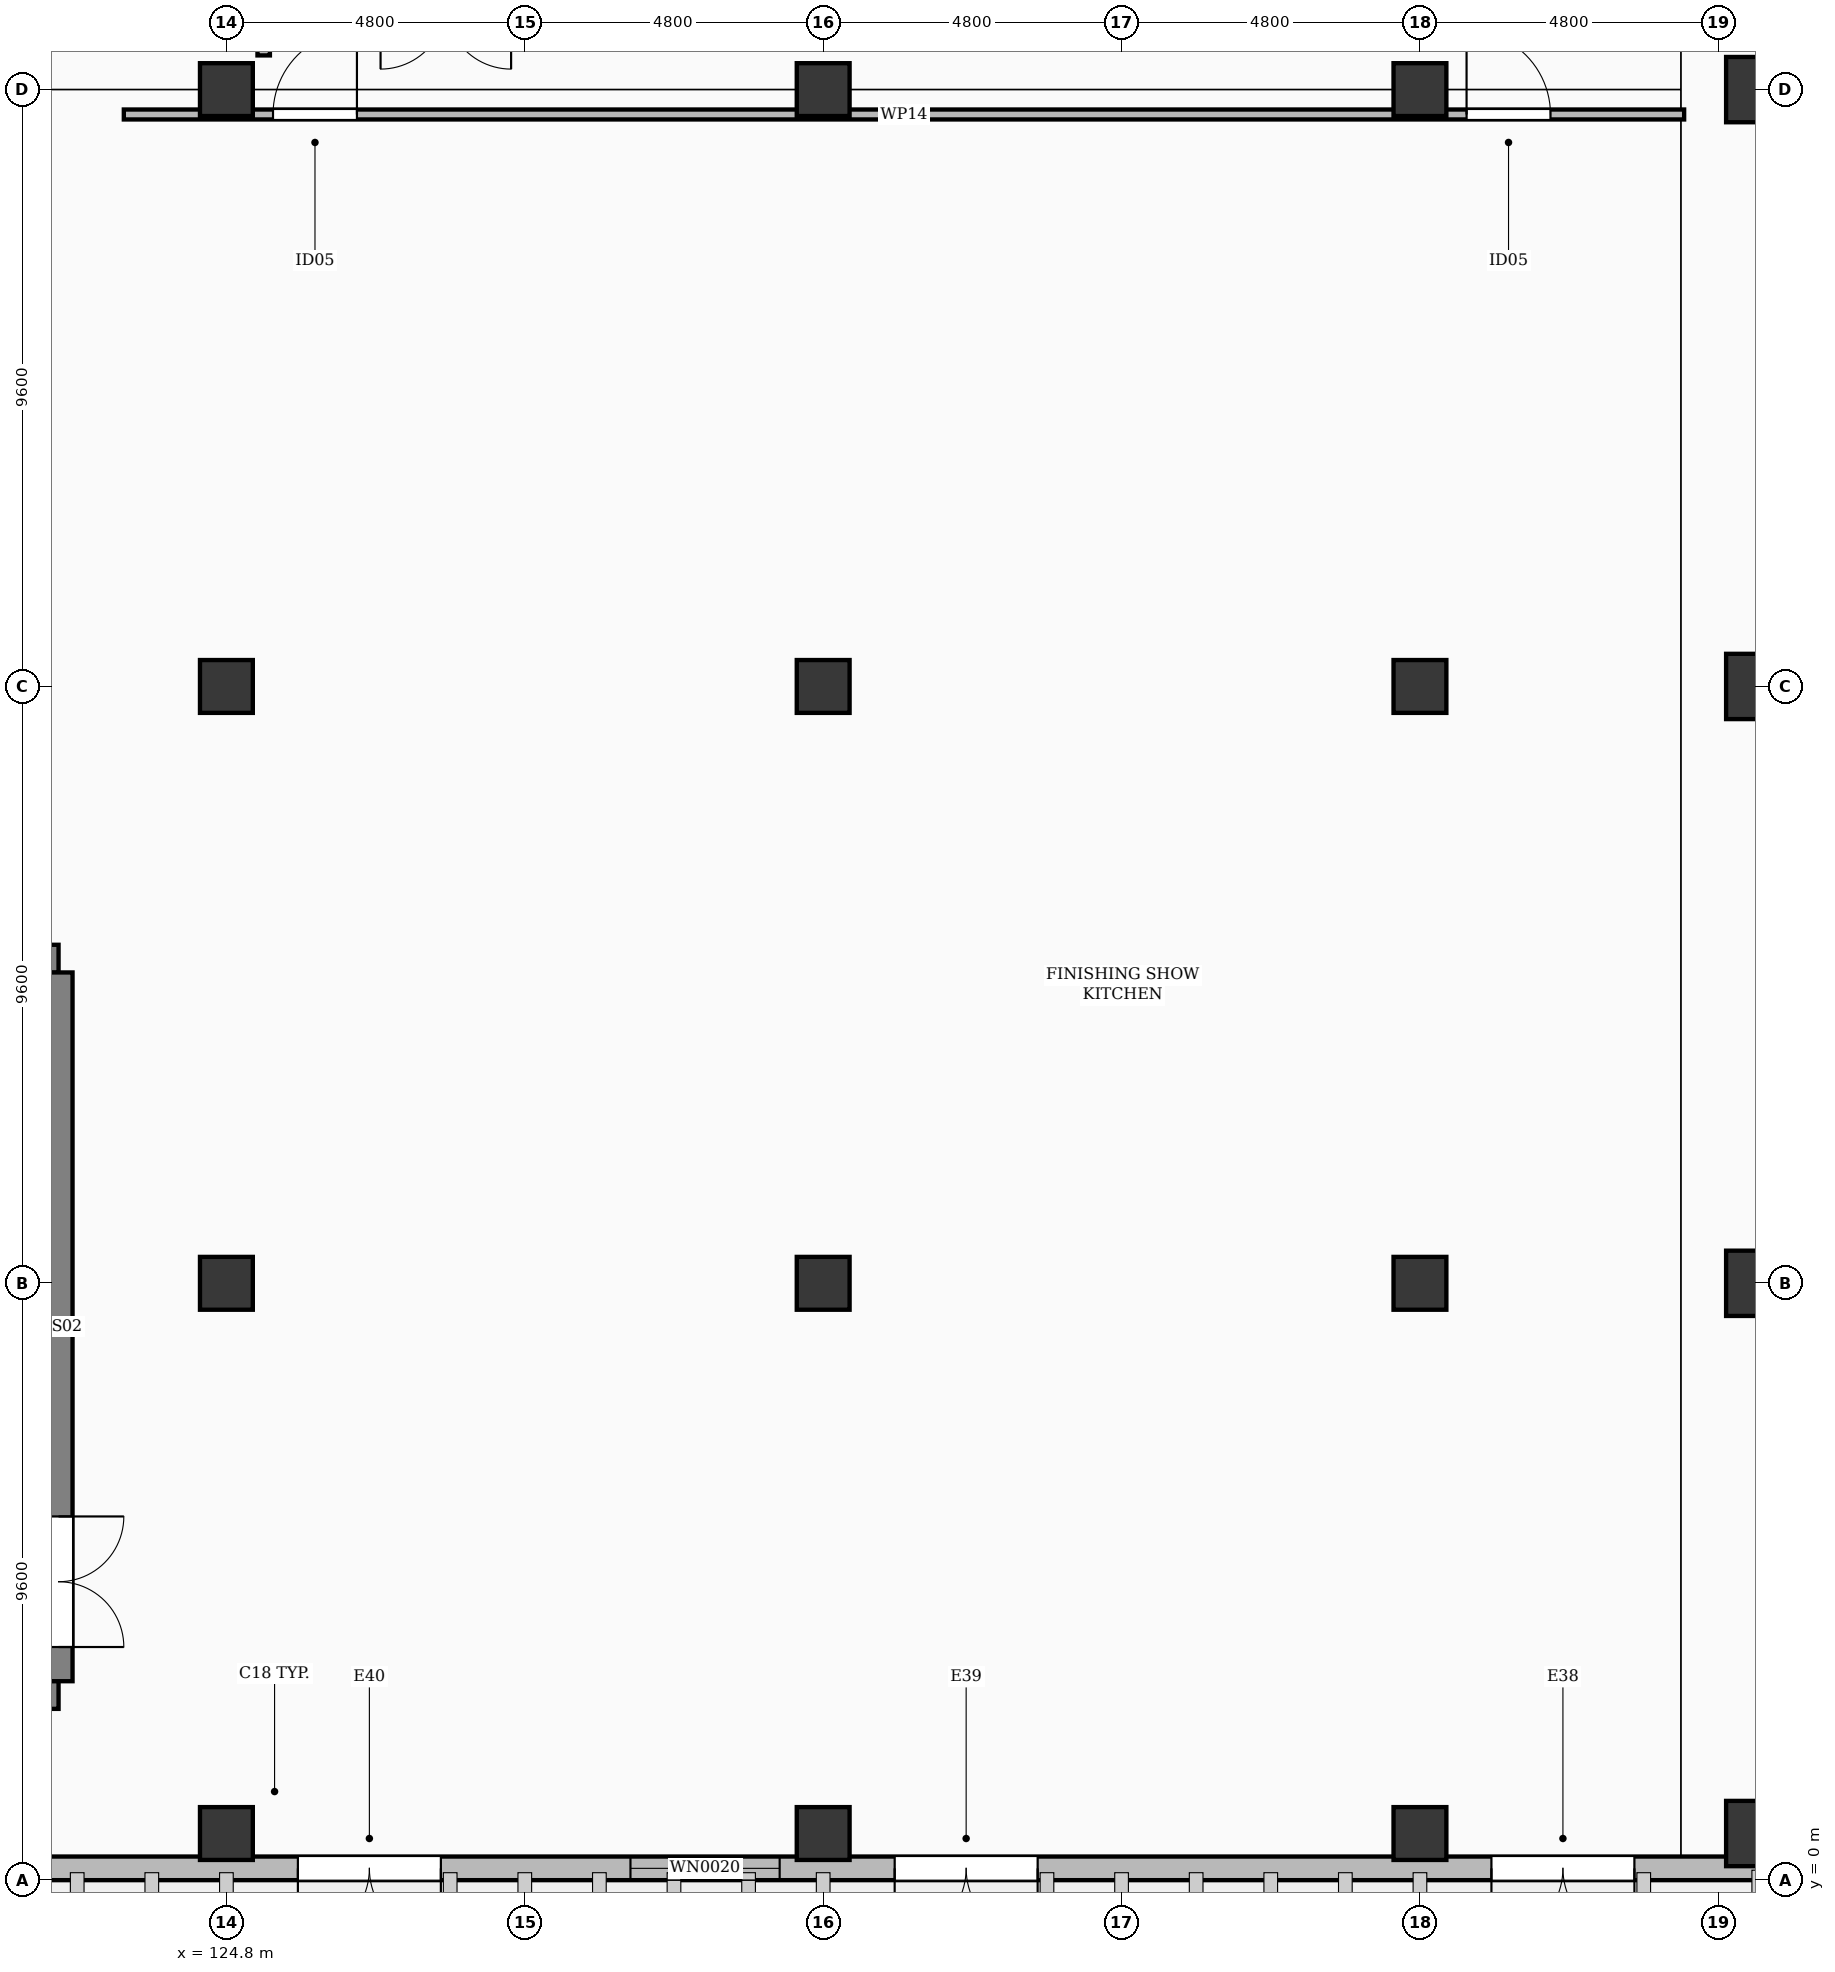
"""IFC4 building model, lengths in metres.
Left out: names, types, materials, properties, quantities, classifications, styles, units other than length and angle.
Written with IfcOpenShell. Run it as: python <this file> out.ifc"""

import sys

from ifc_helpers import new_model, si_unit, direction, frame, frame_2d, origin, origin_2d, place, context, subcontext, project, spatial, rectangle, extrude, element, fill, save


model = new_model("IFC4")
c1 = context("Model", 3, precision=1e-05, world=origin(), true_north=direction((0.0, 1.0)))
c2 = subcontext(c1, "Body", "Model", "MODEL_VIEW")
j1 = project(units=[si_unit("LENGTHUNIT", "METRE"), si_unit("PLANEANGLEUNIT", "RADIAN")], contexts=[c1])
p1 = place(None, origin())
s1 = spatial("IfcSite", under=j1, at=p1, CompositionType="ELEMENT")
p2 = place(p1, origin())
s2 = spatial("IfcBuilding", under=s1, at=p2, CompositionType="ELEMENT")
p3 = place(p2, origin())
s3 = spatial("IfcBuildingStorey", under=s2, at=p3, CompositionType="ELEMENT", Elevation=0.0)
for number, where, z_axis, x_axis in (
    (1, (124.8, 0.75, 0.0), (0.0, 0.0, 1.0), (1.0, 0.0, 0.0)),
    (2, (124.8, 9.6, 0.0), (0.0, 0.0, 1.0), (1.0, 0.0, 0.0)),
    (3, (124.8, 19.2, 0.0), (0.0, 0.0, 1.0), (1.0, 0.0, 0.0)),
    (4, (124.8, 28.8, 0.0), (0.0, 0.0, 1.0), (1.0, 0.0, 0.0)),
    (5, (134.4, 0.75, 0.0), (0.0, 0.0, 1.0), (1.0, 0.0, 0.0)),
    (6, (134.4, 9.6, 0.0), (0.0, 0.0, 1.0), (1.0, 0.0, 0.0)),
    (7, (134.4, 19.2, 0.0), (0.0, 0.0, 1.0), (1.0, 0.0, 0.0)),
    (8, (134.4, 28.8, 0.0), (0.0, 0.0, 1.0), (1.0, 0.0, 0.0)),
    (9, (144.0, 0.75, 0.0), (0.0, 0.0, 1.0), (1.0, 0.0, 0.0)),
    (10, (144.0, 9.6, 0.0), (0.0, 0.0, 1.0), (1.0, 0.0, 0.0)),
    (11, (144.0, 19.2, 0.0), (0.0, 0.0, 1.0), (1.0, 0.0, 0.0)),
    (12, (144.0, 28.8, 0.0), (0.0, 0.0, 1.0), (1.0, 0.0, 0.0)),
):
    element("IfcColumn", number, at=place(p3, frame(where, z_axis=z_axis, x_axis=x_axis)), inside=s3, PredefinedType="COLUMN", context=c2, shape_type="SweptSolid", body=[
        extrude(rectangle(XDim=0.85, YDim=0.85, at=origin_2d()), origin(), (0.0, 0.0, 1.0), 6.0),
    ])
for number, where, z_axis, x_axis in (
    (13, (149.45, 0.75, 0.0), (0.0, 0.0, 1.0), (1.0, 0.0, 0.0)),
    (14, (149.45, 9.6, 0.0), (0.0, 0.0, 1.0), (1.0, 0.0, 0.0)),
    (15, (149.45, 19.2, 0.0), (0.0, 0.0, 1.0), (1.0, 0.0, 0.0)),
    (16, (149.45, 28.8, 0.0), (0.0, 0.0, 1.0), (1.0, 0.0, 0.0)),
):
    element("IfcColumn", number, at=place(p3, frame(where, z_axis=z_axis, x_axis=x_axis)), inside=s3, PredefinedType="COLUMN", context=c2, shape_type="SweptSolid", body=[
        extrude(rectangle(XDim=1.05, YDim=1.05, at=origin_2d()), origin(), (0.0, 0.0, 1.0), 6.0),
    ])
p4 = place(p3, frame((179.65, 0.19, 0.0), z_axis=(0.0, 0.0, 1.0), x_axis=(-1.0, 0.0, 0.0)))
e17 = element("IfcWall", 17, at=p4, inside=s3, PredefinedType="SOLIDWALL", context=c2, shape_type="SweptSolid", body=[
    extrude(rectangle(XDim=121.9, YDim=0.38, at=frame_2d((60.95, 0.0))), origin(), (0.0, 0.0, 1.0), 5.142),
])
p5 = place(p4, frame((3.4, 0.0, 0.0)))
e18 = element("IfcOpeningElement", 18, at=p5, cuts=e17, PredefinedType="OPENING", context=c2, shape_type="SweptSolid", body=[
    extrude(rectangle(XDim=2.3, YDim=2.4, at=frame_2d((1.15, 1.2))), frame((0.0, 0.202, 0.0), z_axis=(0.0, -1.0, 0.0), x_axis=(1.0, 0.0, 0.0)), (0.0, 0.0, 1.0), 0.404),
])
p6 = place(p4, frame((14.05, 0.0, 0.0)))
e19 = element("IfcOpeningElement", 19, at=p6, cuts=e17, PredefinedType="OPENING", context=c2, shape_type="SweptSolid", body=[
    extrude(rectangle(XDim=2.3, YDim=2.4, at=frame_2d((1.15, 1.2))), frame((0.0, 0.202, 0.0), z_axis=(0.0, -1.0, 0.0), x_axis=(1.0, 0.0, 0.0)), (0.0, 0.0, 1.0), 0.404),
])
p7 = place(p4, frame((22.6, 0.0, 0.0)))
e20 = element("IfcOpeningElement", 20, at=p7, cuts=e17, PredefinedType="OPENING", context=c2, shape_type="SweptSolid", body=[
    extrude(rectangle(XDim=2.3, YDim=2.4, at=frame_2d((1.15, 1.2))), frame((0.0, 0.202, 0.0), z_axis=(0.0, -1.0, 0.0), x_axis=(1.0, 0.0, 0.0)), (0.0, 0.0, 1.0), 0.404),
])
p8 = place(p4, frame((32.2, 0.0, 0.0)))
e21 = element("IfcOpeningElement", 21, at=p8, cuts=e17, PredefinedType="OPENING", context=c2, shape_type="SweptSolid", body=[
    extrude(rectangle(XDim=2.3, YDim=2.4, at=frame_2d((1.15, 1.2))), frame((0.0, 0.202, 0.0), z_axis=(0.0, -1.0, 0.0), x_axis=(1.0, 0.0, 0.0)), (0.0, 0.0, 1.0), 0.404),
])
p9 = place(p4, frame((41.8, 0.0, 0.0)))
e22 = element("IfcOpeningElement", 22, at=p9, cuts=e17, PredefinedType="OPENING", context=c2, shape_type="SweptSolid", body=[
    extrude(rectangle(XDim=2.3, YDim=2.4, at=frame_2d((1.15, 1.2))), frame((0.0, 0.202, 0.0), z_axis=(0.0, -1.0, 0.0), x_axis=(1.0, 0.0, 0.0)), (0.0, 0.0, 1.0), 0.404),
])
p10 = place(p4, frame((51.4, 0.0, 0.0)))
e23 = element("IfcOpeningElement", 23, at=p10, cuts=e17, PredefinedType="OPENING", context=c2, shape_type="SweptSolid", body=[
    extrude(rectangle(XDim=2.3, YDim=2.4, at=frame_2d((1.15, 1.2))), frame((0.0, 0.202, 0.0), z_axis=(0.0, -1.0, 0.0), x_axis=(1.0, 0.0, 0.0)), (0.0, 0.0, 1.0), 0.404),
])
p11 = place(p4, frame((61.0, 0.0, 0.0)))
e24 = element("IfcOpeningElement", 24, at=p11, cuts=e17, PredefinedType="OPENING", context=c2, shape_type="SweptSolid", body=[
    extrude(rectangle(XDim=2.3, YDim=2.4, at=frame_2d((1.15, 1.2))), frame((0.0, 0.202, 0.0), z_axis=(0.0, -1.0, 0.0), x_axis=(1.0, 0.0, 0.0)), (0.0, 0.0, 1.0), 0.404),
])
p12 = place(p4, frame((70.6, 0.0, 0.0)))
e25 = element("IfcOpeningElement", 25, at=p12, cuts=e17, PredefinedType="OPENING", context=c2, shape_type="SweptSolid", body=[
    extrude(rectangle(XDim=2.3, YDim=2.4, at=frame_2d((1.15, 1.2))), frame((0.0, 0.202, 0.0), z_axis=(0.0, -1.0, 0.0), x_axis=(1.0, 0.0, 0.0)), (0.0, 0.0, 1.0), 0.404),
])
p13 = place(p4, frame((80.2, 0.0, 0.0)))
e26 = element("IfcOpeningElement", 26, at=p13, cuts=e17, PredefinedType="OPENING", context=c2, shape_type="SweptSolid", body=[
    extrude(rectangle(XDim=2.3, YDim=2.4, at=frame_2d((1.15, 1.2))), frame((0.0, 0.202, 0.0), z_axis=(0.0, -1.0, 0.0), x_axis=(1.0, 0.0, 0.0)), (0.0, 0.0, 1.0), 0.404),
])
p14 = place(p4, frame((89.8, 0.0, 0.0)))
e27 = element("IfcOpeningElement", 27, at=p14, cuts=e17, PredefinedType="OPENING", context=c2, shape_type="SweptSolid", body=[
    extrude(rectangle(XDim=2.3, YDim=2.4, at=frame_2d((1.15, 1.2))), frame((0.0, 0.202, 0.0), z_axis=(0.0, -1.0, 0.0), x_axis=(1.0, 0.0, 0.0)), (0.0, 0.0, 1.0), 0.404),
])
p15 = place(p4, frame((99.4, 0.0, 0.0)))
e28 = element("IfcOpeningElement", 28, at=p15, cuts=e17, PredefinedType="OPENING", context=c2, shape_type="SweptSolid", body=[
    extrude(rectangle(XDim=2.3, YDim=2.4, at=frame_2d((1.15, 1.2))), frame((0.0, 0.202, 0.0), z_axis=(0.0, -1.0, 0.0), x_axis=(1.0, 0.0, 0.0)), (0.0, 0.0, 1.0), 0.404),
])
p16 = place(p4, frame((109.0, 0.0, 0.0)))
e29 = element("IfcOpeningElement", 29, at=p16, cuts=e17, PredefinedType="OPENING", context=c2, shape_type="SweptSolid", body=[
    extrude(rectangle(XDim=2.3, YDim=2.4, at=frame_2d((1.15, 1.2))), frame((0.0, 0.202, 0.0), z_axis=(0.0, -1.0, 0.0), x_axis=(1.0, 0.0, 0.0)), (0.0, 0.0, 1.0), 0.404),
])
p17 = place(p4, frame((7.2, 0.0, 0.8)))
e30 = element("IfcOpeningElement", 30, at=p17, cuts=e17, PredefinedType="OPENING", context=c2, shape_type="SweptSolid", body=[
    extrude(rectangle(XDim=1.6, YDim=2.8, at=frame_2d((0.8, 1.4))), frame((0.0, 0.202, 0.0), z_axis=(0.0, -1.0, 0.0), x_axis=(1.0, 0.0, 0.0)), (0.0, 0.0, 1.0), 0.404),
])
p18 = place(p4, frame((26.4, 0.0, 0.8)))
e31 = element("IfcOpeningElement", 31, at=p18, cuts=e17, PredefinedType="OPENING", context=c2, shape_type="SweptSolid", body=[
    extrude(rectangle(XDim=2.0, YDim=2.8, at=frame_2d((1.0, 1.4))), frame((0.0, 0.202, 0.0), z_axis=(0.0, -1.0, 0.0), x_axis=(1.0, 0.0, 0.0)), (0.0, 0.0, 1.0), 0.404),
])
p19 = place(p4, frame((45.95, 0.0, 0.8)))
e32 = element("IfcOpeningElement", 32, at=p19, cuts=e17, PredefinedType="OPENING", context=c2, shape_type="SweptSolid", body=[
    extrude(rectangle(XDim=2.4, YDim=3.0, at=frame_2d((1.2, 1.5))), frame((0.0, 0.202, 0.0), z_axis=(0.0, -1.0, 0.0), x_axis=(1.0, 0.0, 0.0)), (0.0, 0.0, 1.0), 0.404),
])
p20 = place(p4, frame((65.15, 0.0, 0.8)))
e33 = element("IfcOpeningElement", 33, at=p20, cuts=e17, PredefinedType="OPENING", context=c2, shape_type="SweptSolid", body=[
    extrude(rectangle(XDim=2.8, YDim=3.2, at=frame_2d((1.4, 1.6))), frame((0.0, 0.202, 0.0), z_axis=(0.0, -1.0, 0.0), x_axis=(1.0, 0.0, 0.0)), (0.0, 0.0, 1.0), 0.404),
])
p21 = place(p4, frame((84.35, 0.0, 0.8)))
e34 = element("IfcOpeningElement", 34, at=p21, cuts=e17, PredefinedType="OPENING", context=c2, shape_type="SweptSolid", body=[
    extrude(rectangle(XDim=1.4, YDim=2.5, at=frame_2d((0.7, 1.25))), frame((0.0, 0.202, 0.0), z_axis=(0.0, -1.0, 0.0), x_axis=(1.0, 0.0, 0.0)), (0.0, 0.0, 1.0), 0.404),
])
for number, where, z_axis, x_axis in (
    (35, (116.95, 2.98, 0.0), (0.0, 0.0, 1.0), (1.0, 0.0, 0.0)),
    (36, (116.95, 14.82, 0.0), (0.0, 0.0, 1.0), (1.0, 0.0, 0.0)),
):
    element("IfcWall", number, at=place(p3, frame(where, z_axis=z_axis, x_axis=x_axis)), inside=s3, PredefinedType="SHEAR", context=c2, shape_type="SweptSolid", body=[
        extrude(rectangle(XDim=5.15, YDim=0.45, at=frame_2d((2.575, 0.0))), origin(), (0.0, 0.0, 1.0), 5.7),
    ])
p22 = place(p3, frame((122.1, 3.2, 0.0), z_axis=(0.0, 0.0, 1.0), x_axis=(0.0, 1.0, 0.0)))
e37 = element("IfcWall", 37, at=p22, inside=s3, PredefinedType="SHEAR", context=c2, shape_type="SweptSolid", body=[
    extrude(rectangle(XDim=11.4, YDim=0.45, at=frame_2d((5.7, 0.0))), origin(), (0.0, 0.0, 1.0), 5.7),
])
p23 = place(p22, frame((0.55, 0.0, 0.0)))
e38 = element("IfcOpeningElement", 38, at=p23, cuts=e37, PredefinedType="OPENING", context=c2, shape_type="SweptSolid", body=[
    extrude(rectangle(XDim=2.1, YDim=2.2, at=frame_2d((1.05, 1.1))), frame((0.0, 0.237, 0.0), z_axis=(0.0, -1.0, 0.0), x_axis=(1.0, 0.0, 0.0)), (0.0, 0.0, 1.0), 0.474),
])
p24 = place(p3, frame((125.4, 29.35, 0.0), z_axis=(0.0, 0.0, 1.0), x_axis=(0.0, 1.0, 0.0)))
e39 = element("IfcWall", 39, at=p24, inside=s3, PredefinedType="PARTITIONING", context=c2, shape_type="SweptSolid", body=[
    extrude(rectangle(XDim=11.1, YDim=0.2, at=frame_2d((5.55, 0.0))), origin(), (0.0, 0.0, 1.0), 5.7),
])
p25 = place(p3, frame((123.15, 28.4, 0.0), z_axis=(0.0, 0.0, 1.0), x_axis=(1.0, 0.0, 0.0)))
e40 = element("IfcWall", 40, at=p25, inside=s3, PredefinedType="PARTITIONING", context=c2, shape_type="SweptSolid", body=[
    extrude(rectangle(XDim=25.1, YDim=0.16, at=frame_2d((12.55, 0.0))), origin(), (0.0, 0.0, 1.0), 4.692),
])
p26 = place(p25, frame((2.4, 0.0, 0.0)))
e41 = element("IfcOpeningElement", 41, at=p26, cuts=e40, PredefinedType="OPENING", context=c2, shape_type="SweptSolid", body=[
    extrude(rectangle(XDim=1.35, YDim=2.2, at=frame_2d((0.675, 1.1))), frame((0.0, 0.092, 0.0), z_axis=(0.0, -1.0, 0.0), x_axis=(1.0, 0.0, 0.0)), (0.0, 0.0, 1.0), 0.184),
])
p27 = place(p25, frame((21.6, 0.0, 0.0)))
e42 = element("IfcOpeningElement", 42, at=p27, cuts=e40, PredefinedType="OPENING", context=c2, shape_type="SweptSolid", body=[
    extrude(rectangle(XDim=1.35, YDim=2.2, at=frame_2d((0.675, 1.1))), frame((0.0, 0.092, 0.0), z_axis=(0.0, -1.0, 0.0), x_axis=(1.0, 0.0, 0.0)), (0.0, 0.0, 1.0), 0.184),
])
p28 = place(p8, origin())
e43 = element("IfcDoor", 43, at=p28, inside=s3, OperationType="DOUBLE_DOOR_SINGLE_SWING", PredefinedType="DOOR", context=c2, shape_type="SweptSolid", body=[
    extrude(rectangle(XDim=2.3, YDim=2.4, at=frame_2d((1.15, 1.2))), frame((0.0, 0.025, 0.0), z_axis=(0.0, -1.0, 0.0), x_axis=(1.0, 0.0, 0.0)), (0.0, 0.0, 1.0), 0.05),
])
fill(e21, e43)
p29 = place(p9, origin())
e44 = element("IfcDoor", 44, at=p29, inside=s3, OperationType="DOUBLE_DOOR_SINGLE_SWING", PredefinedType="DOOR", context=c2, shape_type="SweptSolid", body=[
    extrude(rectangle(XDim=2.3, YDim=2.4, at=frame_2d((1.15, 1.2))), frame((0.0, 0.025, 0.0), z_axis=(0.0, -1.0, 0.0), x_axis=(1.0, 0.0, 0.0)), (0.0, 0.0, 1.0), 0.05),
])
fill(e22, e44)
p30 = place(p10, origin())
e45 = element("IfcDoor", 45, at=p30, inside=s3, OperationType="DOUBLE_DOOR_SINGLE_SWING", PredefinedType="DOOR", context=c2, shape_type="SweptSolid", body=[
    extrude(rectangle(XDim=2.3, YDim=2.4, at=frame_2d((1.15, 1.2))), frame((0.0, 0.025, 0.0), z_axis=(0.0, -1.0, 0.0), x_axis=(1.0, 0.0, 0.0)), (0.0, 0.0, 1.0), 0.05),
])
fill(e23, e45)
p31 = place(p19, origin())
e46 = element("IfcWindow", 46, at=p31, inside=s3, PartitioningType="SINGLE_PANEL", PredefinedType="WINDOW", context=c2, shape_type="SweptSolid", body=[
    extrude(rectangle(XDim=2.4, YDim=3.0, at=frame_2d((1.2, 1.5))), frame((0.0, 0.03, 0.0), z_axis=(0.0, -1.0, 0.0), x_axis=(1.0, 0.0, 0.0)), (0.0, 0.0, 1.0), 0.06),
])
fill(e32, e46)
p32 = place(p23, frame((2.1, 0.0, 0.0), z_axis=(0.0, 0.0, 1.0), x_axis=(-1.0, 0.0, 0.0)))
e47 = element("IfcDoor", 47, at=p32, inside=s3, OperationType="DOUBLE_DOOR_SINGLE_SWING", PredefinedType="DOOR", context=c2, shape_type="SweptSolid", body=[
    extrude(rectangle(XDim=2.1, YDim=2.2, at=frame_2d((1.05, 1.1))), frame((0.0, 0.025, 0.0), z_axis=(0.0, -1.0, 0.0), x_axis=(1.0, 0.0, 0.0)), (0.0, 0.0, 1.0), 0.05),
])
fill(e38, e47)
p33 = place(p26, origin())
e48 = element("IfcDoor", 48, at=p33, inside=s3, OperationType="SINGLE_SWING_RIGHT", PredefinedType="DOOR", context=c2, shape_type="SweptSolid", body=[
    extrude(rectangle(XDim=1.35, YDim=2.2, at=frame_2d((0.675, 1.1))), frame((0.0, 0.025, 0.0), z_axis=(0.0, -1.0, 0.0), x_axis=(1.0, 0.0, 0.0)), (0.0, 0.0, 1.0), 0.05),
])
fill(e41, e48)
p34 = place(p27, origin())
e49 = element("IfcDoor", 49, at=p34, inside=s3, OperationType="SINGLE_SWING_LEFT", PredefinedType="DOOR", context=c2, shape_type="SweptSolid", body=[
    extrude(rectangle(XDim=1.35, YDim=2.2, at=frame_2d((0.675, 1.1))), frame((0.0, 0.025, 0.0), z_axis=(0.0, -1.0, 0.0), x_axis=(1.0, 0.0, 0.0)), (0.0, 0.0, 1.0), 0.05),
])
fill(e42, e49)
save(model, sys.argv[1])
